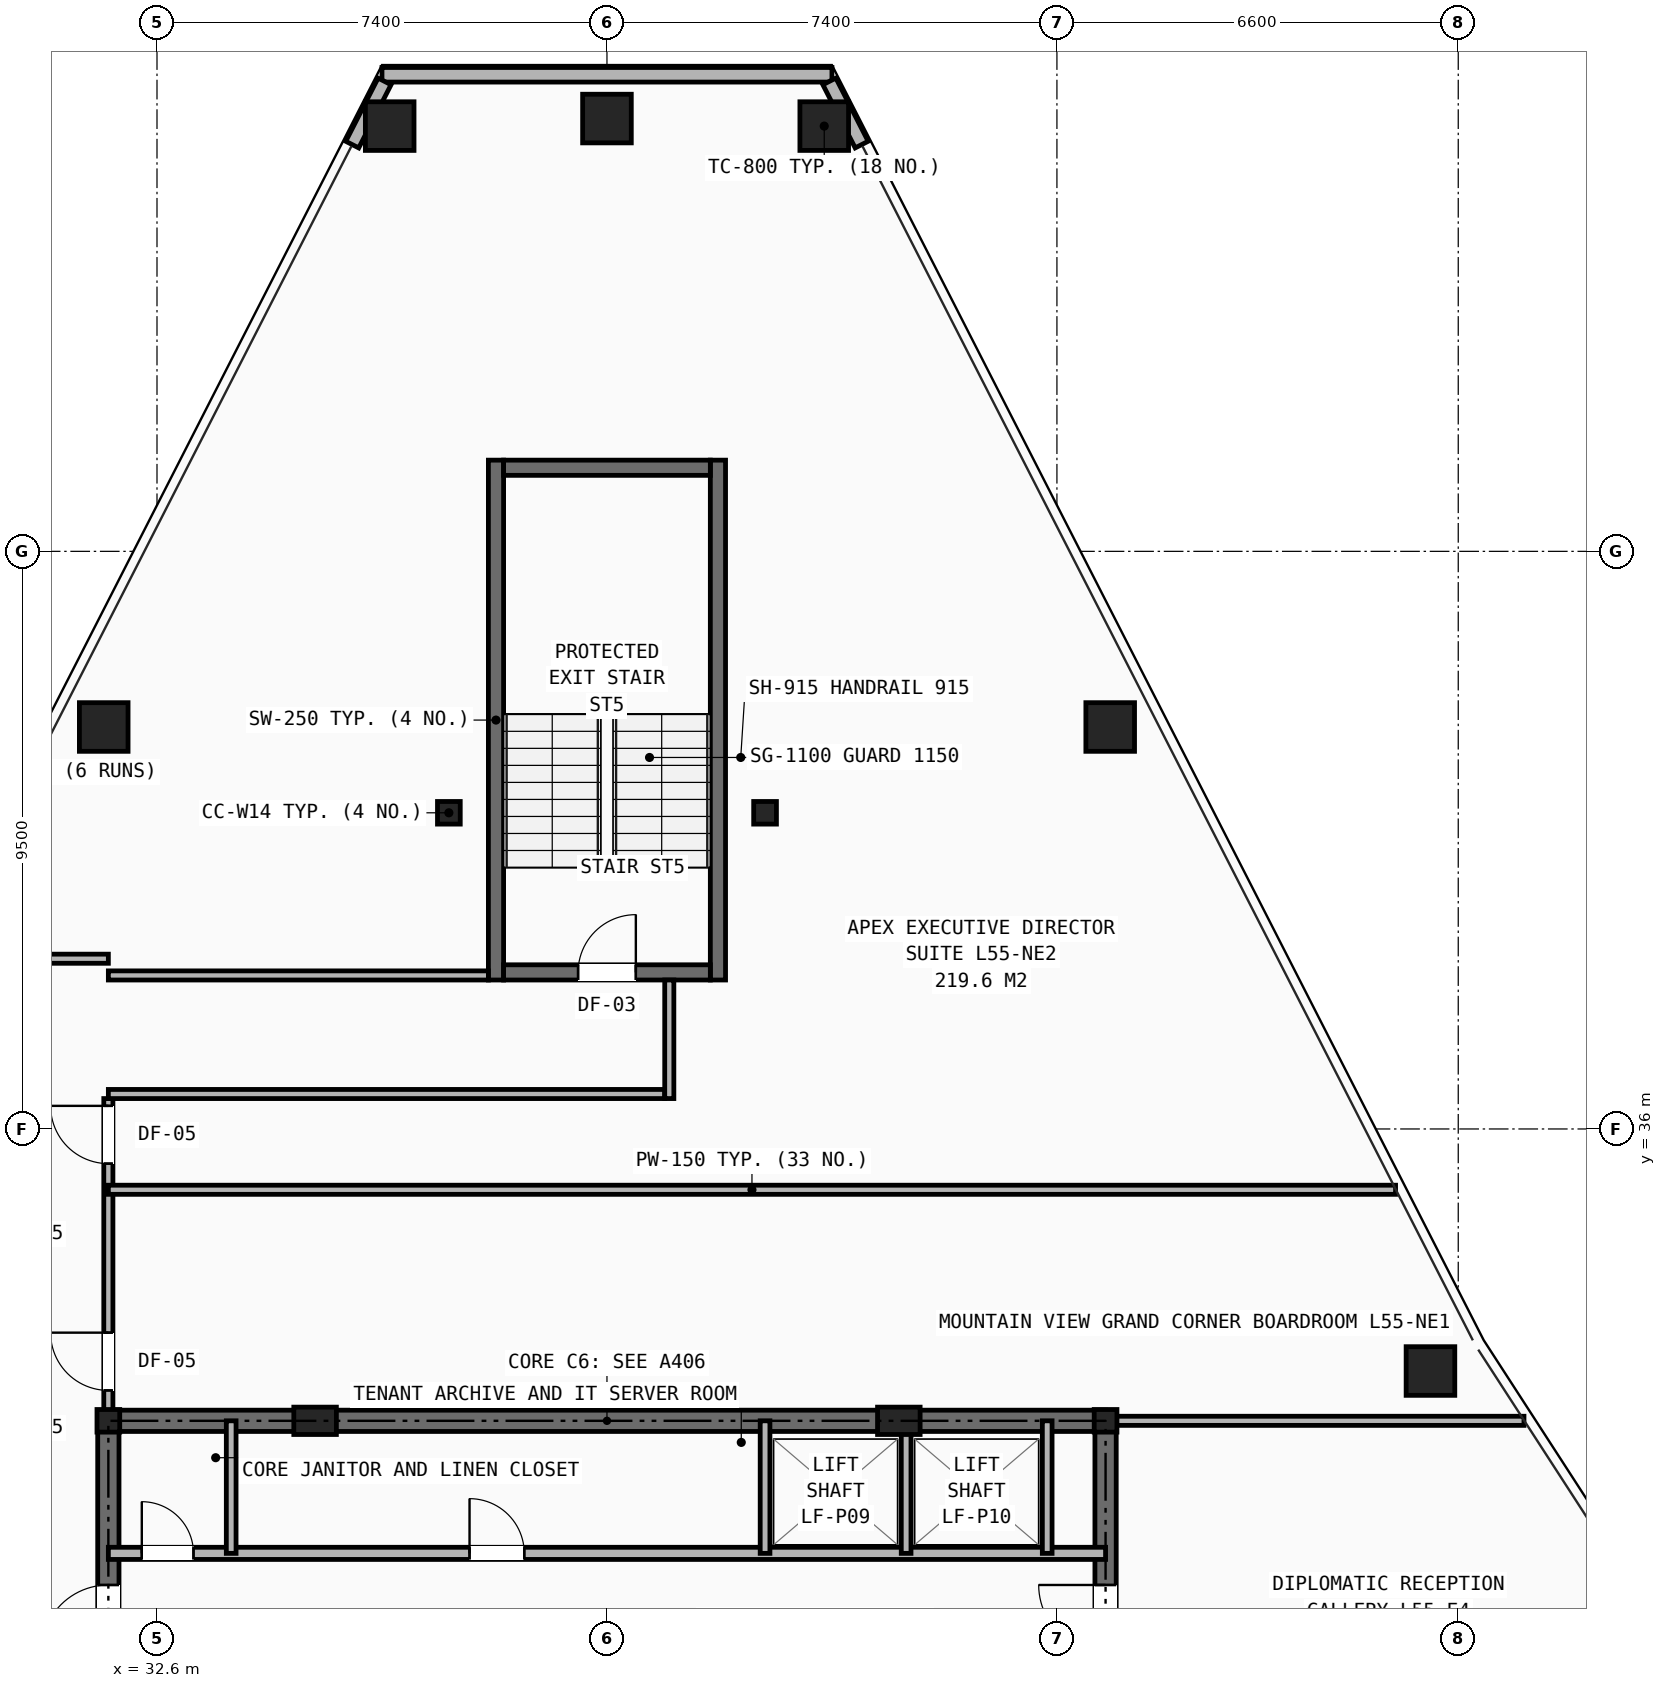
"""IFC4 building model, lengths in metres.
Left out: names, types, materials, properties, quantities, classifications, styles, units other than length and angle.
Written with IfcOpenShell. Run it as: python <this file> out.ifc"""

import sys

from ifc_helpers import new_model, si_unit, direction, frame, frame_2d, origin, origin_2d, place, context, subcontext, project, spatial, rectangle, hollow_rectangle, i_section, extrude, element, fill, save


model = new_model("IFC4")
c1 = context("Model", 3, precision=1e-05, world=origin(), true_north=direction((0.0, 1.0)))
c2 = subcontext(c1, "Body", "Model", "MODEL_VIEW")
j1 = project(units=[si_unit("LENGTHUNIT", "METRE"), si_unit("PLANEANGLEUNIT", "RADIAN")], contexts=[c1])
p1 = place(None, origin())
s1 = spatial("IfcSite", under=j1, at=p1, CompositionType="ELEMENT")
p2 = place(p1, origin())
s2 = spatial("IfcBuilding", under=s1, at=p2, CompositionType="ELEMENT")
p3 = place(p2, frame((0.0, 0.0, 193.05)))
s3 = spatial("IfcBuildingStorey", under=s2, at=p3, CompositionType="ELEMENT", Elevation=193.05)
for number, where, z_axis, x_axis in (
    (1, (31.8, 31.2, 0.0), (0.0, 0.0, 1.0), (1.0, 0.0, 0.0)),
    (2, (48.2, 31.2, 0.0), (0.0, 0.0, 1.0), (1.0, 0.0, 0.0)),
    (3, (37.4, 41.2, 0.0), (0.0, 0.0, 1.0), (1.0, 0.0, 0.0)),
    (4, (42.6, 41.2, 0.0), (0.0, 0.0, 1.0), (1.0, 0.0, 0.0)),
):
    element("IfcColumn", number, at=place(p3, frame(where, z_axis=z_axis, x_axis=x_axis)), inside=s3, PredefinedType="COLUMN", context=c2, shape_type="SweptSolid", body=[
        extrude(i_section(OverallWidth=0.374, OverallDepth=0.372, WebThickness=0.016, FlangeThickness=0.026, at=origin_2d()), origin(), (0.0, 0.0, 1.0), 3.45),
    ])
for number, where, z_axis, x_axis in (
    (5, (35.2, 31.2, 0.0), (0.0, 0.0, 1.0), (1.0, 0.0, 0.0)),
    (6, (44.8, 31.2, 0.0), (0.0, 0.0, 1.0), (1.0, 0.0, 0.0)),
):
    element("IfcColumn", number, at=place(p3, frame(where, z_axis=z_axis, x_axis=x_axis)), inside=s3, PredefinedType="PILASTER", context=c2, shape_type="SweptSolid", body=[
        extrude(rectangle(XDim=0.7, YDim=0.45, at=origin_2d()), origin(), (0.0, 0.0, 1.0), 3.45),
    ])
for number, where, z_axis, x_axis in (
    (7, (43.573, 52.494, 0.0), (0.0, 0.0, 1.0), (1.0, 0.0, 0.0)),
    (8, (40.0, 52.618, 0.0), (0.0, 0.0, 1.0), (1.0, 0.0, 0.0)),
    (9, (36.427, 52.494, 0.0), (0.0, 0.0, 1.0), (1.0, 0.0, 0.0)),
    (10, (31.724, 42.611, 0.0), (0.0, 0.0, 1.0), (1.0, 0.0, 0.0)),
    (11, (53.543, 32.019, 0.0), (0.0, 0.0, 1.0), (1.0, 0.0, 0.0)),
    (12, (48.276, 42.611, 0.0), (0.0, 0.0, 1.0), (1.0, 0.0, 0.0)),
):
    element("IfcColumn", number, at=place(p3, frame(where, z_axis=z_axis, x_axis=x_axis)), inside=s3, PredefinedType="COLUMN", context=c2, shape_type="SweptSolid", body=[
        extrude(hollow_rectangle(XDim=0.8, YDim=0.8, WallThickness=0.055, at=origin_2d()), origin(), (0.0, 0.0, 1.0), 3.45),
    ])
p4 = place(p3, frame((36.3, 53.338, 0.0), z_axis=(0.0, 0.0, 1.0), x_axis=(1.0, 0.0, 0.0)))
e13 = element("IfcWall", 13, at=p4, inside=s3, PredefinedType="SHEAR", context=c2, shape_type="SweptSolid", body=[
    extrude(rectangle(XDim=7.4, YDim=0.24, at=frame_2d((3.7, 0.0))), origin(), (0.0, 0.0, 1.0), 2.403),
])
for number, where, z_axis, x_axis in (
    (14, (36.342, 53.229, 0.0), (0.0, 0.0, 1.0), (-0.455, -0.891, 0.0)),
    (15, (44.189, 52.19, 0.0), (0.0, 0.0, 1.0), (-0.455, 0.891, 0.0)),
):
    element("IfcWall", number, at=place(p3, frame(where, z_axis=z_axis, x_axis=x_axis)), inside=s3, PredefinedType="SHEAR", context=c2, shape_type="SweptSolid", body=[
        extrude(rectangle(XDim=1.168, YDim=0.24, at=frame_2d((0.584, 0.0))), origin(), (0.0, 0.0, 1.0), 2.403),
    ])
p5 = place(p3, frame((31.8, 31.2, 0.0), z_axis=(0.0, 0.0, 1.0), x_axis=(1.0, 0.0, 0.0)))
e16 = element("IfcWall", 16, at=p5, inside=s3, PredefinedType="SHEAR", context=c2, shape_type="SweptSolid", body=[
    extrude(rectangle(XDim=16.4, YDim=0.35, at=frame_2d((8.2, 0.0))), origin(), (0.0, 0.0, 1.0), 3.03),
])
p6 = place(p3, frame((31.8, 16.4, 0.0), z_axis=(0.0, 0.0, 1.0), x_axis=(0.0, 1.0, 0.0)))
e17 = element("IfcWall", 17, at=p6, inside=s3, PredefinedType="SHEAR", context=c2, shape_type="SweptSolid", body=[
    extrude(rectangle(XDim=14.8, YDim=0.35, at=frame_2d((7.4, 0.0))), origin(), (0.0, 0.0, 1.0), 3.03),
])
p7 = place(p6, frame((11.0, 0.0, 0.0)))
e18 = element("IfcOpeningElement", 18, at=p7, cuts=e17, PredefinedType="OPENING", context=c2, shape_type="SweptSolid", body=[
    extrude(rectangle(XDim=1.1, YDim=2.15, at=frame_2d((0.55, 1.075))), frame((0.0, 0.185, 0.0), z_axis=(0.0, -1.0, 0.0), x_axis=(1.0, 0.0, 0.0)), (0.0, 0.0, 1.0), 0.37),
])
p8 = place(p3, frame((48.2, 16.4, 0.0), z_axis=(0.0, 0.0, 1.0), x_axis=(0.0, 1.0, 0.0)))
e19 = element("IfcWall", 19, at=p8, inside=s3, PredefinedType="SHEAR", context=c2, shape_type="SweptSolid", body=[
    extrude(rectangle(XDim=14.8, YDim=0.35, at=frame_2d((7.4, 0.0))), origin(), (0.0, 0.0, 1.0), 3.03),
])
p9 = place(p8, frame((11.0, 0.0, 0.0)))
e20 = element("IfcOpeningElement", 20, at=p9, cuts=e19, PredefinedType="OPENING", context=c2, shape_type="SweptSolid", body=[
    extrude(rectangle(XDim=1.1, YDim=2.15, at=frame_2d((0.55, 1.075))), frame((0.0, 0.185, 0.0), z_axis=(0.0, -1.0, 0.0), x_axis=(1.0, 0.0, 0.0)), (0.0, 0.0, 1.0), 0.37),
])
p10 = place(p3, frame((31.8, 29.02, 0.0), z_axis=(0.0, 0.0, 1.0), x_axis=(1.0, 0.0, 0.0)))
e21 = element("IfcWall", 21, at=p10, inside=s3, PredefinedType="SOLIDWALL", context=c2, shape_type="SweptSolid", body=[
    extrude(rectangle(XDim=16.4, YDim=0.2, at=frame_2d((8.2, 0.0))), origin(), (0.0, 0.0, 1.0), 2.485),
])
p11 = place(p10, frame((0.55, 0.0, 0.0)))
e22 = element("IfcOpeningElement", 22, at=p11, cuts=e21, PredefinedType="OPENING", context=c2, shape_type="SweptSolid", body=[
    extrude(rectangle(XDim=0.85, YDim=2.05, at=frame_2d((0.425, 1.025))), frame((0.0, 0.11, 0.0), z_axis=(0.0, -1.0, 0.0), x_axis=(1.0, 0.0, 0.0)), (0.0, 0.0, 1.0), 0.22),
])
p12 = place(p10, frame((5.94, 0.0, 0.0)))
e23 = element("IfcOpeningElement", 23, at=p12, cuts=e21, PredefinedType="OPENING", context=c2, shape_type="SweptSolid", body=[
    extrude(rectangle(XDim=0.9, YDim=2.1, at=frame_2d((0.45, 1.05))), frame((0.0, 0.11, 0.0), z_axis=(0.0, -1.0, 0.0), x_axis=(1.0, 0.0, 0.0)), (0.0, 0.0, 1.0), 0.22),
])
for number, where, z_axis, x_axis in (
    (24, (33.82, 29.02, 0.0), (0.0, 0.0, 1.0), (0.0, 1.0, 0.0)),
    (25, (42.6, 29.02, 0.0), (0.0, 0.0, 1.0), (0.0, 1.0, 0.0)),
    (26, (44.92, 29.02, 0.0), (0.0, 0.0, 1.0), (0.0, 1.0, 0.0)),
    (27, (47.24, 29.02, 0.0), (0.0, 0.0, 1.0), (0.0, 1.0, 0.0)),
):
    element("IfcWall", number, at=place(p3, frame(where, z_axis=z_axis, x_axis=x_axis)), inside=s3, PredefinedType="SOLIDWALL", context=c2, shape_type="SweptSolid", body=[
        extrude(rectangle(XDim=2.18, YDim=0.16, at=frame_2d((1.09, 0.0))), origin(), (0.0, 0.0, 1.0), 2.758),
    ])
p13 = place(p3, frame((31.8, 31.2, 0.0), z_axis=(0.0, 0.0, 1.0), x_axis=(0.0, 1.0, 0.0)))
e28 = element("IfcWall", 28, at=p13, inside=s3, PredefinedType="PARTITIONING", context=c2, shape_type="SweptSolid", body=[
    extrude(rectangle(XDim=5.3, YDim=0.15, at=frame_2d((2.65, 0.0))), origin(), (0.0, 0.0, 1.0), 2.241),
])
p14 = place(p13, frame((0.5, 0.0, 0.0)))
e29 = element("IfcOpeningElement", 29, at=p14, cuts=e28, PredefinedType="OPENING", context=c2, shape_type="SweptSolid", body=[
    extrude(rectangle(XDim=0.95, YDim=2.1, at=frame_2d((0.475, 1.05))), frame((0.0, 0.085, 0.0), z_axis=(0.0, -1.0, 0.0), x_axis=(1.0, 0.0, 0.0)), (0.0, 0.0, 1.0), 0.17),
])
p15 = place(p13, frame((4.23, 0.0, 0.0)))
e30 = element("IfcOpeningElement", 30, at=p15, cuts=e28, PredefinedType="OPENING", context=c2, shape_type="SweptSolid", body=[
    extrude(rectangle(XDim=0.95, YDim=2.1, at=frame_2d((0.475, 1.05))), frame((0.0, 0.085, 0.0), z_axis=(0.0, -1.0, 0.0), x_axis=(1.0, 0.0, 0.0)), (0.0, 0.0, 1.0), 0.17),
])
p16 = place(p3, frame((29.6, 38.8, 0.0), z_axis=(0.0, 0.0, 1.0), x_axis=(1.0, 0.0, 0.0)))
e31 = element("IfcWall", 31, at=p16, inside=s3, PredefinedType="PARTITIONING", context=c2, shape_type="SweptSolid", body=[
    extrude(rectangle(XDim=2.2, YDim=0.15, at=frame_2d((1.1, 0.0))), origin(), (0.0, 0.0, 1.0), 2.409),
])
p17 = place(p3, frame((48.2, 31.2, 0.0), z_axis=(0.0, 0.0, 1.0), x_axis=(1.0, 0.0, 0.0)))
e32 = element("IfcWall", 32, at=p17, inside=s3, PredefinedType="PARTITIONING", context=c2, shape_type="SweptSolid", body=[
    extrude(rectangle(XDim=6.881, YDim=0.15, at=frame_2d((3.44, 0.0))), origin(), (0.0, 0.0, 1.0), 2.241),
])
p18 = place(p3, frame((31.8, 35.0, 0.0), z_axis=(0.0, 0.0, 1.0), x_axis=(1.0, 0.0, 0.0)))
e33 = element("IfcWall", 33, at=p18, inside=s3, PredefinedType="PARTITIONING", context=c2, shape_type="SweptSolid", body=[
    extrude(rectangle(XDim=21.169, YDim=0.15, at=frame_2d((10.584, 0.0))), origin(), (0.0, 0.0, 1.0), 2.409),
])
for number, where, z_axis, x_axis in (
    (34, (38.175, 38.45, 0.0), (0.0, 0.0, 1.0), (0.0, 1.0, 0.0)),
    (35, (41.825, 38.45, 0.0), (0.0, 0.0, 1.0), (0.0, 1.0, 0.0)),
):
    element("IfcWall", number, at=place(p3, frame(where, z_axis=z_axis, x_axis=x_axis)), inside=s3, PredefinedType="SHEAR", context=c2, shape_type="SweptSolid", body=[
        extrude(rectangle(XDim=8.55, YDim=0.25, at=frame_2d((4.275, 0.0))), origin(), (0.0, 0.0, 1.0), 3.03),
    ])
p19 = place(p3, frame((38.3, 38.575, 0.0), z_axis=(0.0, 0.0, 1.0), x_axis=(1.0, 0.0, 0.0)))
e36 = element("IfcWall", 36, at=p19, inside=s3, PredefinedType="SHEAR", context=c2, shape_type="SweptSolid", body=[
    extrude(rectangle(XDim=3.4, YDim=0.25, at=frame_2d((1.7, 0.0))), origin(), (0.0, 0.0, 1.0), 3.03),
])
p20 = place(p19, frame((1.225, 0.0, 0.0)))
e37 = element("IfcOpeningElement", 37, at=p20, cuts=e36, PredefinedType="OPENING", context=c2, shape_type="SweptSolid", body=[
    extrude(rectangle(XDim=0.95, YDim=2.1, at=frame_2d((0.475, 1.05))), frame((0.0, 0.135, 0.0), z_axis=(0.0, -1.0, 0.0), x_axis=(1.0, 0.0, 0.0)), (0.0, 0.0, 1.0), 0.27),
])
p21 = place(p3, frame((38.3, 46.875, 0.0), z_axis=(0.0, 0.0, 1.0), x_axis=(1.0, 0.0, 0.0)))
e38 = element("IfcWall", 38, at=p21, inside=s3, PredefinedType="SHEAR", context=c2, shape_type="SweptSolid", body=[
    extrude(rectangle(XDim=3.4, YDim=0.25, at=frame_2d((1.7, 0.0))), origin(), (0.0, 0.0, 1.0), 3.03),
])
p22 = place(p3, frame((31.8, 36.575, 0.0), z_axis=(0.0, 0.0, 1.0), x_axis=(1.0, 0.0, 0.0)))
e39 = element("IfcWall", 39, at=p22, inside=s3, PredefinedType="PARTITIONING", context=c2, shape_type="SweptSolid", body=[
    extrude(rectangle(XDim=9.15, YDim=0.15, at=frame_2d((4.575, 0.0))), origin(), (0.0, 0.0, 1.0), 2.613),
])
p23 = place(p3, frame((31.8, 38.525, 0.0), z_axis=(0.0, 0.0, 1.0), x_axis=(1.0, 0.0, 0.0)))
e40 = element("IfcWall", 40, at=p23, inside=s3, PredefinedType="PARTITIONING", context=c2, shape_type="SweptSolid", body=[
    extrude(rectangle(XDim=6.25, YDim=0.15, at=frame_2d((3.125, 0.0))), origin(), (0.0, 0.0, 1.0), 2.613),
])
p24 = place(p3, frame((41.025, 36.5, 0.0), z_axis=(0.0, 0.0, 1.0), x_axis=(0.0, 1.0, 0.0)))
e41 = element("IfcWall", 41, at=p24, inside=s3, PredefinedType="PARTITIONING", context=c2, shape_type="SweptSolid", body=[
    extrude(rectangle(XDim=1.95, YDim=0.15, at=frame_2d((0.975, 0.0))), origin(), (0.0, 0.0, 1.0), 3.03),
])
p25 = place(p11, origin())
e42 = element("IfcDoor", 42, at=p25, inside=s3, OperationType="SINGLE_SWING_LEFT", PredefinedType="DOOR", context=c2, shape_type="SweptSolid", body=[
    extrude(rectangle(XDim=0.85, YDim=2.05, at=frame_2d((0.425, 1.025))), frame((0.0, 0.025, 0.0), z_axis=(0.0, -1.0, 0.0), x_axis=(1.0, 0.0, 0.0)), (0.0, 0.0, 1.0), 0.05),
])
fill(e22, e42)
p26 = place(p7, origin())
e43 = element("IfcDoor", 43, at=p26, inside=s3, OperationType="SINGLE_SWING_LEFT", PredefinedType="DOOR", context=c2, shape_type="SweptSolid", body=[
    extrude(rectangle(XDim=1.1, YDim=2.15, at=frame_2d((0.55, 1.075))), frame((0.0, 0.025, 0.0), z_axis=(0.0, -1.0, 0.0), x_axis=(1.0, 0.0, 0.0)), (0.0, 0.0, 1.0), 0.05),
])
fill(e18, e43)
p27 = place(p9, origin())
e44 = element("IfcDoor", 44, at=p27, inside=s3, OperationType="SINGLE_SWING_RIGHT", PredefinedType="DOOR", context=c2, shape_type="SweptSolid", body=[
    extrude(rectangle(XDim=1.1, YDim=2.15, at=frame_2d((0.55, 1.075))), frame((0.0, 0.025, 0.0), z_axis=(0.0, -1.0, 0.0), x_axis=(1.0, 0.0, 0.0)), (0.0, 0.0, 1.0), 0.05),
])
fill(e20, e44)
p28 = place(p12, origin())
e45 = element("IfcDoor", 45, at=p28, inside=s3, OperationType="SINGLE_SWING_LEFT", PredefinedType="DOOR", context=c2, shape_type="SweptSolid", body=[
    extrude(rectangle(XDim=0.9, YDim=2.1, at=frame_2d((0.45, 1.05))), frame((0.0, 0.025, 0.0), z_axis=(0.0, -1.0, 0.0), x_axis=(1.0, 0.0, 0.0)), (0.0, 0.0, 1.0), 0.05),
])
fill(e23, e45)
p29 = place(p14, origin())
e46 = element("IfcDoor", 46, at=p29, inside=s3, OperationType="SINGLE_SWING_RIGHT", PredefinedType="DOOR", context=c2, shape_type="SweptSolid", body=[
    extrude(rectangle(XDim=0.95, YDim=2.1, at=frame_2d((0.475, 1.05))), frame((0.0, 0.025, 0.0), z_axis=(0.0, -1.0, 0.0), x_axis=(1.0, 0.0, 0.0)), (0.0, 0.0, 1.0), 0.05),
])
fill(e29, e46)
p30 = place(p15, origin())
e47 = element("IfcDoor", 47, at=p30, inside=s3, OperationType="SINGLE_SWING_RIGHT", PredefinedType="DOOR", context=c2, shape_type="SweptSolid", body=[
    extrude(rectangle(XDim=0.95, YDim=2.1, at=frame_2d((0.475, 1.05))), frame((0.0, 0.025, 0.0), z_axis=(0.0, -1.0, 0.0), x_axis=(1.0, 0.0, 0.0)), (0.0, 0.0, 1.0), 0.05),
])
fill(e30, e47)
p31 = place(p20, origin())
e48 = element("IfcDoor", 48, at=p31, inside=s3, OperationType="SINGLE_SWING_RIGHT", PredefinedType="DOOR", context=c2, shape_type="SweptSolid", body=[
    extrude(rectangle(XDim=0.95, YDim=2.1, at=frame_2d((0.475, 1.05))), frame((0.0, 0.025, 0.0), z_axis=(0.0, -1.0, 0.0), x_axis=(1.0, 0.0, 0.0)), (0.0, 0.0, 1.0), 0.05),
])
fill(e37, e48)
save(model, sys.argv[1])
